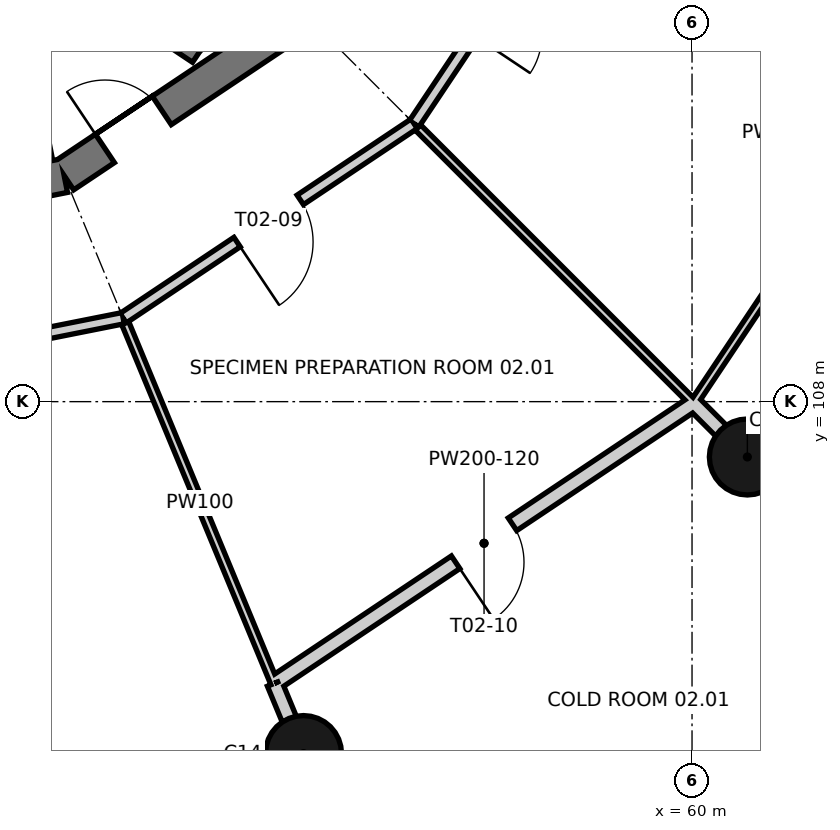
"""IFC4 building model, lengths in metres.
Left out: names, types, materials, properties, quantities, classifications, styles, units other than length and angle.
Written with IfcOpenShell. Run it as: python <this file> out.ifc"""

import sys

from ifc_helpers import new_model, si_unit, direction, frame, frame_2d, origin, origin_2d, place, context, subcontext, project, spatial, polyline, rectangle, circle, outline, extrude, element, fill, save


model = new_model("IFC4")
c1 = context("Model", 3, precision=1e-05, world=origin(), true_north=direction((0.0, 1.0)))
c2 = subcontext(c1, "Body", "Model", "MODEL_VIEW")
j1 = project(units=[si_unit("LENGTHUNIT", "METRE"), si_unit("PLANEANGLEUNIT", "RADIAN")], contexts=[c1])
p1 = place(None, origin())
s1 = spatial("IfcSite", under=j1, at=p1, CompositionType="ELEMENT")
p2 = place(p1, origin())
s2 = spatial("IfcBuilding", under=s1, at=p2, CompositionType="ELEMENT")
p3 = place(p2, frame((0.0, 0.0, 10.8)))
s3 = spatial("IfcBuildingStorey", under=s2, at=p3, CompositionType="ELEMENT", Elevation=10.8)
p4 = place(p3, frame((48.0, 110.229, 0.0), z_axis=(0.0, 0.0, 1.0), x_axis=(0.98078948206, 0.195069197673, 0.0)))
e1 = element("IfcWall", 1, at=p4, inside=s3, PredefinedType="SHEAR", context=c2, shape_type="SweptSolid", body=[
    extrude(outline(polyline([(-0.045, -0.225), (3.857, -0.225), (3.768, 0.225), (0.045, 0.225), (-0.045, -0.225)])), origin(), (0.0, 0.0, 1.0), 4.8),
])
p5 = place(p4, frame((1.495, 0.0, 0.0)))
e2 = element("IfcOpeningElement", 2, at=p5, cuts=e1, PredefinedType="OPENING", context=c2, shape_type="SweptSolid", body=[
    extrude(rectangle(XDim=0.9, YDim=2.1, at=frame_2d((0.45, 1.05))), frame((0.0, 0.235, 0.0), z_axis=(0.0, -1.0, 0.0), x_axis=(1.0, 0.0, 0.0)), (0.0, 0.0, 1.0), 0.47),
])
p6 = place(p3, frame((51.739, 110.973, 0.0), z_axis=(0.0, 0.0, 1.0), x_axis=(0.83148829117, 0.555542277102, 0.0)))
e3 = element("IfcWall", 3, at=p6, inside=s3, PredefinedType="SHEAR", context=c2, shape_type="SweptSolid", body=[
    extrude(outline(polyline([(-0.045, -0.225), (3.857, -0.225), (3.768, 0.225), (0.045, 0.225), (-0.045, -0.225)])), origin(), (0.0, 0.0, 1.0), 4.8),
])
p7 = place(p6, frame((0.645, 0.0, 0.0)))
e4 = element("IfcOpeningElement", 4, at=p7, cuts=e3, PredefinedType="OPENING", context=c2, shape_type="SweptSolid", body=[
    extrude(rectangle(XDim=0.9, YDim=2.1, at=frame_2d((0.45, 1.05))), frame((0.0, 0.235, 0.0), z_axis=(0.0, -1.0, 0.0), x_axis=(1.0, 0.0, 0.0)), (0.0, 0.0, 1.0), 0.47),
])
p8 = place(p3, frame((48.994, 115.548, 0.0), z_axis=(0.0, 0.0, 1.0), x_axis=(0.831444656906, -0.555607579593, 0.0)))
e5 = element("IfcWall", 5, at=p8, inside=s3, PredefinedType="SHEAR", context=c2, shape_type="SweptSolid", body=[
    extrude(rectangle(XDim=5.4, YDim=0.2, at=frame_2d((2.7, 0.0))), origin(), (0.0, 0.0, 1.0), 4.8),
])
for number, where, z_axis, x_axis in (
    (6, (54.888, 103.37, 0.0), (0.0, 0.0, 1.0), (1.0, 0.0, 0.0)),
    (7, (60.728, 107.272, 0.0), (0.0, 0.0, 1.0), (1.0, 0.0, 0.0)),
):
    element("IfcColumn", number, at=place(p3, frame(where, z_axis=z_axis, x_axis=x_axis)), inside=s3, PredefinedType="COLUMN", context=c2, shape_type="SweptSolid", body=[
        extrude(circle(Radius=0.5, at=origin_2d()), origin(), (0.0, 0.0, 1.0), 4.8),
    ])
p9 = place(p3, frame((56.763, 98.843, 0.0), z_axis=(0.0, 0.0, 1.0), x_axis=(0.83146552215, 0.555576354317, 0.0)))
e8 = element("IfcWall", 8, at=p9, inside=s3, PredefinedType="SOLIDWALL", context=c2, shape_type="SweptSolid", body=[
    extrude(outline(polyline([(-0.03, -0.15), (8.965, -0.15), (8.905, 0.15), (0.03, 0.15), (-0.03, -0.15)])), origin(), (0.0, 0.0, 1.0), 3.72),
])
p10 = place(p9, frame((0.834, 0.0, 0.9)))
e9 = element("IfcOpeningElement", 9, at=p10, cuts=e8, PredefinedType="OPENING", context=c2, shape_type="SweptSolid", body=[
    extrude(rectangle(XDim=2.8, YDim=1.8, at=frame_2d((1.4, 0.9))), frame((0.0, 0.16, 0.0), z_axis=(0.0, -1.0, 0.0), x_axis=(1.0, 0.0, 0.0)), (0.0, 0.0, 1.0), 0.32),
])
p11 = place(p9, frame((5.302, 0.0, 0.9)))
e10 = element("IfcOpeningElement", 10, at=p11, cuts=e8, PredefinedType="OPENING", context=c2, shape_type="SweptSolid", body=[
    extrude(rectangle(XDim=2.8, YDim=1.8, at=frame_2d((1.4, 0.9))), frame((0.0, 0.16, 0.0), z_axis=(0.0, -1.0, 0.0), x_axis=(1.0, 0.0, 0.0)), (0.0, 0.0, 1.0), 0.32),
])
p12 = place(p3, frame((50.912, 114.059, 0.0), z_axis=(0.0, 0.0, 1.0), x_axis=(0.195101986683, -0.980782960085, 0.0)))
e11 = element("IfcWall", 11, at=p12, inside=s3, PredefinedType="SOLIDWALL", context=c2, shape_type="SweptSolid", body=[
    extrude(rectangle(XDim=2.963, YDim=0.2, at=frame_2d((1.481, 0.0))), origin(), (0.0, 0.0, 1.0), 4.52),
])
p13 = place(p3, frame((52.516, 109.098, 0.0), z_axis=(0.0, 0.0, 1.0), x_axis=(-0.980786124026, -0.19508608079, 0.0)))
e12 = element("IfcWall", 12, at=p13, inside=s3, PredefinedType="PARTITIONING", context=c2, shape_type="SweptSolid", body=[
    extrude(rectangle(XDim=4.604, YDim=0.15, at=frame_2d((2.302, 0.0))), origin(), (0.0, 0.0, 1.0), 4.52),
])
p14 = place(p13, frame((1.802, 0.0, 0.0)))
e13 = element("IfcOpeningElement", 13, at=p14, cuts=e12, PredefinedType="OPENING", context=c2, shape_type="SweptSolid", body=[
    extrude(rectangle(XDim=1.0, YDim=2.1, at=frame_2d((0.5, 1.05))), frame((0.0, 0.085, 0.0), z_axis=(0.0, -1.0, 0.0), x_axis=(1.0, 0.0, 0.0)), (0.0, 0.0, 1.0), 0.17),
])
p15 = place(p3, frame((56.344, 111.656, 0.0), z_axis=(0.0, 0.0, 1.0), x_axis=(-0.831486983854, -0.555544233776, 0.0)))
e14 = element("IfcWall", 14, at=p15, inside=s3, PredefinedType="PARTITIONING", context=c2, shape_type="SweptSolid", body=[
    extrude(rectangle(XDim=4.604, YDim=0.15, at=frame_2d((2.302, 0.0))), origin(), (0.0, 0.0, 1.0), 4.52),
])
p16 = place(p15, frame((1.802, 0.0, 0.0)))
e15 = element("IfcOpeningElement", 15, at=p16, cuts=e14, PredefinedType="OPENING", context=c2, shape_type="SweptSolid", body=[
    extrude(rectangle(XDim=1.0, YDim=2.1, at=frame_2d((0.5, 1.05))), frame((0.0, 0.085, 0.0), z_axis=(0.0, -1.0, 0.0), x_axis=(1.0, 0.0, 0.0)), (0.0, 0.0, 1.0), 0.17),
])
p17 = place(p3, frame((58.902, 115.484, 0.0), z_axis=(0.0, 0.0, 1.0), x_axis=(-0.555544233776, -0.831486983854, 0.0)))
e16 = element("IfcWall", 16, at=p17, inside=s3, PredefinedType="PARTITIONING", context=c2, shape_type="SweptSolid", body=[
    extrude(rectangle(XDim=4.604, YDim=0.15, at=frame_2d((2.302, 0.0))), origin(), (0.0, 0.0, 1.0), 4.52),
])
p18 = place(p17, frame((1.402, 0.0, 0.0)))
e17 = element("IfcOpeningElement", 17, at=p18, cuts=e16, PredefinedType="OPENING", context=c2, shape_type="SweptSolid", body=[
    extrude(rectangle(XDim=1.8, YDim=2.1, at=frame_2d((0.9, 1.05))), frame((0.0, 0.085, 0.0), z_axis=(0.0, -1.0, 0.0), x_axis=(1.0, 0.0, 0.0)), (0.0, 0.0, 1.0), 0.17),
])
p19 = place(p3, frame((52.543, 109.032, 0.0), z_axis=(0.0, 0.0, 1.0), x_axis=(0.382697954548, -0.923873517093, 0.0)))
e18 = element("IfcWall", 18, at=p19, inside=s3, PredefinedType="PARTITIONING", context=c2, shape_type="SweptSolid", body=[
    extrude(rectangle(XDim=5.128, YDim=0.1, at=frame_2d((2.564, 0.0))), origin(), (0.0, 0.0, 1.0), 3.72),
])
p20 = place(p3, frame((54.506, 104.294, 0.0), z_axis=(0.0, 0.0, 1.0), x_axis=(0.382337704268, -0.924022662003, 0.0)))
e19 = element("IfcWall", 19, at=p20, inside=s3, PredefinedType="SOLIDWALL", context=c2, shape_type="SweptSolid", body=[
    extrude(rectangle(XDim=0.51, YDim=0.2, at=frame_2d((0.255, 0.0))), origin(), (0.0, 0.0, 1.0), 3.72),
])
p21 = place(p3, frame((59.983, 107.954, 0.0), z_axis=(0.0, 0.0, 1.0), x_axis=(-0.831469879838, -0.555569832625, 0.0)))
e20 = element("IfcWall", 20, at=p21, inside=s3, PredefinedType="SOLIDWALL", context=c2, shape_type="SweptSolid", body=[
    extrude(rectangle(XDim=6.541, YDim=0.2, at=frame_2d((3.271, 0.0))), origin(), (0.0, 0.0, 1.0), 4.52),
])
p22 = place(p21, frame((2.82, 0.0, 0.0)))
e21 = element("IfcOpeningElement", 21, at=p22, cuts=e20, PredefinedType="OPENING", context=c2, shape_type="SweptSolid", body=[
    extrude(rectangle(XDim=0.9, YDim=2.1, at=frame_2d((0.45, 1.05))), frame((0.0, 0.11, 0.0), z_axis=(0.0, -1.0, 0.0), x_axis=(1.0, 0.0, 0.0)), (0.0, 0.0, 1.0), 0.22),
])
p23 = place(p3, frame((56.395, 111.605, 0.0), z_axis=(0.0, 0.0, 1.0), x_axis=(0.707106781187, -0.707106781187, 0.0)))
e22 = element("IfcWall", 22, at=p23, inside=s3, PredefinedType="PARTITIONING", context=c2, shape_type="SweptSolid", body=[
    extrude(rectangle(XDim=5.128, YDim=0.1, at=frame_2d((2.564, 0.0))), origin(), (0.0, 0.0, 1.0), 3.72),
])
p24 = place(p3, frame((60.021, 107.979, 0.0), z_axis=(0.0, 0.0, 1.0), x_axis=(0.707106781187, -0.707106781187, 0.0)))
e23 = element("IfcWall", 23, at=p24, inside=s3, PredefinedType="SOLIDWALL", context=c2, shape_type="SweptSolid", body=[
    extrude(rectangle(XDim=0.51, YDim=0.2, at=frame_2d((0.255, 0.0))), origin(), (0.0, 0.0, 1.0), 3.72),
])
p25 = place(p3, frame((63.706, 113.494, 0.0), z_axis=(0.0, 0.0, 1.0), x_axis=(-0.555572294061, -0.831468235155, 0.0)))
e24 = element("IfcWall", 24, at=p25, inside=s3, PredefinedType="PARTITIONING", context=c2, shape_type="SweptSolid", body=[
    extrude(rectangle(XDim=6.587, YDim=0.1, at=frame_2d((3.293, 0.0))), origin(), (0.0, 0.0, 1.0), 4.52),
])
p26 = place(p25, frame((2.793, 0.0, 0.0)))
e25 = element("IfcOpeningElement", 25, at=p26, cuts=e24, PredefinedType="OPENING", context=c2, shape_type="SweptSolid", body=[
    extrude(rectangle(XDim=1.0, YDim=2.1, at=frame_2d((0.5, 1.05))), frame((0.0, 0.06, 0.0), z_axis=(0.0, -1.0, 0.0), x_axis=(1.0, 0.0, 0.0)), (0.0, 0.0, 1.0), 0.12),
])
p27 = place(p7, origin())
e26 = element("IfcDoor", 26, at=p27, inside=s3, OperationType="SINGLE_SWING_LEFT", PredefinedType="DOOR", context=c2, shape_type="SweptSolid", body=[
    extrude(rectangle(XDim=0.9, YDim=2.1, at=frame_2d((0.45, 1.05))), frame((0.0, 0.025, 0.0), z_axis=(0.0, -1.0, 0.0), x_axis=(1.0, 0.0, 0.0)), (0.0, 0.0, 1.0), 0.05),
])
fill(e4, e26)
p28 = place(p16, origin())
e27 = element("IfcDoor", 27, at=p28, inside=s3, OperationType="SINGLE_SWING_RIGHT", PredefinedType="DOOR", context=c2, shape_type="SweptSolid", body=[
    extrude(rectangle(XDim=1.0, YDim=2.1, at=frame_2d((0.5, 1.05))), frame((0.0, 0.025, 0.0), z_axis=(0.0, -1.0, 0.0), x_axis=(1.0, 0.0, 0.0)), (0.0, 0.0, 1.0), 0.05),
])
fill(e15, e27)
p29 = place(p22, origin())
e28 = element("IfcDoor", 28, at=p29, inside=s3, OperationType="SINGLE_SWING_RIGHT", PredefinedType="DOOR", context=c2, shape_type="SweptSolid", body=[
    extrude(rectangle(XDim=0.9, YDim=2.1, at=frame_2d((0.45, 1.05))), frame((0.0, 0.025, 0.0), z_axis=(0.0, -1.0, 0.0), x_axis=(1.0, 0.0, 0.0)), (0.0, 0.0, 1.0), 0.05),
])
fill(e21, e28)
save(model, sys.argv[1])
